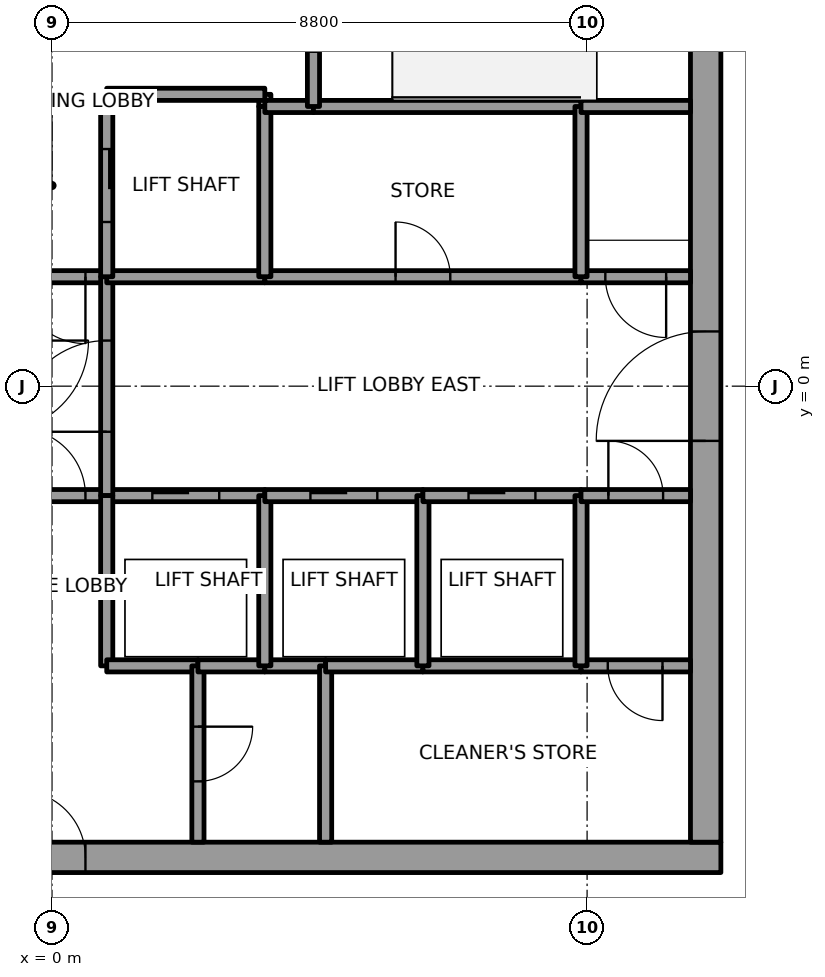
"""IFC4 building model, lengths in metres.
Left out: names, types, materials, properties, quantities, classifications, styles, units other than length and angle.
Written with IfcOpenShell. Run it as: python <this file> out.ifc"""

import sys

from ifc_helpers import new_model, si_unit, direction, frame, frame_2d, origin, place, context, subcontext, project, spatial, rectangle, extrude, element, fill, save


model = new_model("IFC4")
c1 = context("Model", 3, precision=1e-05, world=origin(), true_north=direction((0.0, 1.0)))
c2 = subcontext(c1, "Body", "Model", "MODEL_VIEW")
j1 = project(units=[si_unit("LENGTHUNIT", "METRE"), si_unit("PLANEANGLEUNIT", "RADIAN")], contexts=[c1])
p1 = place(None, origin())
s1 = spatial("IfcSite", under=j1, at=p1, CompositionType="ELEMENT")
p2 = place(p1, origin())
s2 = spatial("IfcBuilding", under=s1, at=p2, CompositionType="ELEMENT")
p3 = place(p2, frame((0.0, 0.0, 251.0)))
s3 = spatial("IfcBuildingStorey", under=s2, at=p3, CompositionType="ELEMENT", Elevation=251.0)
p4 = place(p3, frame((-11.0, -7.75, 0.0), z_axis=(0.0, 0.0, 1.0), x_axis=(1.0, 0.0, 0.0)))
e1 = element("IfcWall", 1, at=p4, inside=s3, PredefinedType="SHEAR", context=c2, shape_type="SweptSolid", body=[
    extrude(rectangle(XDim=22.0, YDim=0.5, at=frame_2d((11.0, 0.0))), origin(), (0.0, 0.0, 1.0), 4.0),
])
p5 = place(p4, frame((10.45, 0.0, 0.0)))
e2 = element("IfcOpeningElement", 2, at=p5, cuts=e1, PredefinedType="OPENING", context=c2, shape_type="SweptSolid", body=[
    extrude(rectangle(XDim=1.1, YDim=2.1, at=frame_2d((0.55, 1.05))), frame((0.0, 0.25, 0.0), z_axis=(0.0, -1.0, 0.0), x_axis=(1.0, 0.0, 0.0)), (0.0, 0.0, 1.0), 0.5),
])
p6 = place(p3, frame((10.75, -7.5, 0.0), z_axis=(0.0, 0.0, 1.0), x_axis=(0.0, 1.0, 0.0)))
e3 = element("IfcWall", 3, at=p6, inside=s3, PredefinedType="SHEAR", context=c2, shape_type="SweptSolid", body=[
    extrude(rectangle(XDim=15.0, YDim=0.5, at=frame_2d((7.5, 0.0))), origin(), (0.0, 0.0, 1.0), 4.0),
])
p7 = place(p6, frame((6.6, 0.0, 0.0)))
e4 = element("IfcOpeningElement", 4, at=p7, cuts=e3, PredefinedType="OPENING", context=c2, shape_type="SweptSolid", body=[
    extrude(rectangle(XDim=1.8, YDim=2.1, at=frame_2d((0.9, 1.05))), frame((0.0, 0.25, 0.0), z_axis=(0.0, -1.0, 0.0), x_axis=(1.0, 0.0, 0.0)), (0.0, 0.0, 1.0), 0.5),
])
p8 = place(p3, frame((-0.9, -1.8, 0.0), z_axis=(0.0, 0.0, 1.0), x_axis=(1.0, 0.0, 0.0)))
e5 = element("IfcWall", 5, at=p8, inside=s3, PredefinedType="SOLIDWALL", context=c2, shape_type="SweptSolid", body=[
    extrude(rectangle(XDim=1.8, YDim=0.2, at=frame_2d((0.9, 0.0))), origin(), (0.0, 0.0, 1.0), 3.85),
])
p9 = place(p8, frame((0.35, 0.0, 0.0)))
e6 = element("IfcOpeningElement", 6, at=p9, cuts=e5, PredefinedType="OPENING", context=c2, shape_type="SweptSolid", body=[
    extrude(rectangle(XDim=1.1, YDim=2.1, at=frame_2d((0.55, 1.05))), frame((0.0, 0.1, 0.0), z_axis=(0.0, -1.0, 0.0), x_axis=(1.0, 0.0, 0.0)), (0.0, 0.0, 1.0), 0.2),
])
p10 = place(p3, frame((0.9, 1.8, 0.0), z_axis=(0.0, 0.0, 1.0), x_axis=(-1.0, 0.0, 0.0)))
e7 = element("IfcWall", 7, at=p10, inside=s3, PredefinedType="SOLIDWALL", context=c2, shape_type="SweptSolid", body=[
    extrude(rectangle(XDim=1.8, YDim=0.2, at=frame_2d((0.9, 0.0))), origin(), (0.0, 0.0, 1.0), 3.85),
])
p11 = place(p10, frame((0.35, 0.0, 0.0)))
e8 = element("IfcOpeningElement", 8, at=p11, cuts=e7, PredefinedType="OPENING", context=c2, shape_type="SweptSolid", body=[
    extrude(rectangle(XDim=1.1, YDim=2.1, at=frame_2d((0.55, 1.05))), frame((0.0, 0.1, 0.0), z_axis=(0.0, -1.0, 0.0), x_axis=(1.0, 0.0, 0.0)), (0.0, 0.0, 1.0), 0.2),
])
p12 = place(p3, frame((0.9, -1.8, 0.0), z_axis=(0.0, 0.0, 1.0), x_axis=(1.0, 0.0, 0.0)))
e9 = element("IfcWall", 9, at=p12, inside=s3, PredefinedType="SOLIDWALL", context=c2, shape_type="SweptSolid", body=[
    extrude(rectangle(XDim=2.6, YDim=0.2, at=frame_2d((1.3, 0.0))), origin(), (0.0, 0.0, 1.0), 3.85),
])
p13 = place(p12, frame((0.75, 0.0, 0.0)))
e10 = element("IfcOpeningElement", 10, at=p13, cuts=e9, PredefinedType="OPENING", context=c2, shape_type="SweptSolid", body=[
    extrude(rectangle(XDim=1.1, YDim=2.1, at=frame_2d((0.55, 1.05))), frame((0.0, 0.1, 0.0), z_axis=(0.0, -1.0, 0.0), x_axis=(1.0, 0.0, 0.0)), (0.0, 0.0, 1.0), 0.2),
])
p14 = place(p3, frame((0.9, -1.8, 0.0), z_axis=(0.0, 0.0, 1.0), x_axis=(0.0, 1.0, 0.0)))
e11 = element("IfcWall", 11, at=p14, inside=s3, PredefinedType="SOLIDWALL", context=c2, shape_type="SweptSolid", body=[
    extrude(rectangle(XDim=3.6, YDim=0.2, at=frame_2d((1.8, 0.0))), origin(), (0.0, 0.0, 1.0), 3.85),
])
p15 = place(p14, frame((1.05, 0.0, 0.0)))
e12 = element("IfcOpeningElement", 12, at=p15, cuts=e11, PredefinedType="OPENING", context=c2, shape_type="SweptSolid", body=[
    extrude(rectangle(XDim=1.5, YDim=2.1, at=frame_2d((0.75, 1.05))), frame((0.0, 0.1, 0.0), z_axis=(0.0, -1.0, 0.0), x_axis=(1.0, 0.0, 0.0)), (0.0, 0.0, 1.0), 0.2),
])
p16 = place(p3, frame((0.9, -1.8, 0.0), z_axis=(0.0, 0.0, 1.0), x_axis=(0.0, -1.0, 0.0)))
e13 = element("IfcWall", 13, at=p16, inside=s3, PredefinedType="SOLIDWALL", context=c2, shape_type="SweptSolid", body=[
    extrude(rectangle(XDim=2.8, YDim=0.2, at=frame_2d((1.4, 0.0))), origin(), (0.0, 0.0, 1.0), 3.85),
])
p17 = place(p3, frame((0.9, -4.6, 0.0), z_axis=(0.0, 0.0, 1.0), x_axis=(1.0, 0.0, 0.0)))
e14 = element("IfcWall", 14, at=p17, inside=s3, PredefinedType="SOLIDWALL", context=c2, shape_type="SweptSolid", body=[
    extrude(rectangle(XDim=1.5, YDim=0.2, at=frame_2d((0.75, 0.0))), origin(), (0.0, 0.0, 1.0), 3.85),
])
p18 = place(p3, frame((3.5, 1.8, 0.0), z_axis=(0.0, 0.0, 1.0), x_axis=(-1.0, 0.0, 0.0)))
e15 = element("IfcWall", 15, at=p18, inside=s3, PredefinedType="SOLIDWALL", context=c2, shape_type="SweptSolid", body=[
    extrude(rectangle(XDim=2.6, YDim=0.2, at=frame_2d((1.3, 0.0))), origin(), (0.0, 0.0, 1.0), 3.85),
])
p19 = place(p3, frame((3.5, 4.6, 0.0), z_axis=(0.0, 0.0, 1.0), x_axis=(0.0, 1.0, 0.0)))
e16 = element("IfcWall", 16, at=p19, inside=s3, PredefinedType="SOLIDWALL", context=c2, shape_type="SweptSolid", body=[
    extrude(rectangle(XDim=0.2, YDim=0.2, at=frame_2d((0.1, 0.0))), origin(), (0.0, 0.0, 1.0), 3.85),
])
p20 = place(p3, frame((3.5, 4.8, 0.0), z_axis=(0.0, 0.0, 1.0), x_axis=(-1.0, 0.0, 0.0)))
e17 = element("IfcWall", 17, at=p20, inside=s3, PredefinedType="SOLIDWALL", context=c2, shape_type="SweptSolid", body=[
    extrude(rectangle(XDim=2.6, YDim=0.2, at=frame_2d((1.3, 0.0))), origin(), (0.0, 0.0, 1.0), 3.85),
])
p21 = place(p3, frame((0.9, 4.8, 0.0), z_axis=(0.0, 0.0, 1.0), x_axis=(0.0, -1.0, 0.0)))
e18 = element("IfcWall", 18, at=p21, inside=s3, PredefinedType="SOLIDWALL", context=c2, shape_type="SweptSolid", body=[
    extrude(rectangle(XDim=3.0, YDim=0.2, at=frame_2d((1.5, 0.0))), origin(), (0.0, 0.0, 1.0), 3.85),
])
p22 = place(p21, frame((0.9, 0.0, 0.0)))
e19 = element("IfcOpeningElement", 19, at=p22, cuts=e18, PredefinedType="OPENING", context=c2, shape_type="SweptSolid", body=[
    extrude(rectangle(XDim=1.2, YDim=2.1, at=frame_2d((0.6, 1.05))), frame((0.0, 0.1, 0.0), z_axis=(0.0, -1.0, 0.0), x_axis=(1.0, 0.0, 0.0)), (0.0, 0.0, 1.0), 0.2),
])
p23 = place(p3, frame((2.4, -4.6, 0.0), z_axis=(0.0, 0.0, 1.0), x_axis=(0.0, -1.0, 0.0)))
e20 = element("IfcWall", 20, at=p23, inside=s3, PredefinedType="SOLIDWALL", context=c2, shape_type="SweptSolid", body=[
    extrude(rectangle(XDim=2.9, YDim=0.2, at=frame_2d((1.45, 0.0))), origin(), (0.0, 0.0, 1.0), 3.85),
])
p24 = place(p23, frame((1.0, 0.0, 0.0)))
e21 = element("IfcOpeningElement", 21, at=p24, cuts=e20, PredefinedType="OPENING", context=c2, shape_type="SweptSolid", body=[
    extrude(rectangle(XDim=0.9, YDim=2.1, at=frame_2d((0.45, 1.05))), frame((0.0, 0.1, 0.0), z_axis=(0.0, -1.0, 0.0), x_axis=(1.0, 0.0, 0.0)), (0.0, 0.0, 1.0), 0.2),
])
p25 = place(p3, frame((3.5, -4.6, 0.0), z_axis=(0.0, 0.0, 1.0), x_axis=(-1.0, 0.0, 0.0)))
e22 = element("IfcWall", 22, at=p25, inside=s3, PredefinedType="SOLIDWALL", context=c2, shape_type="SweptSolid", body=[
    extrude(rectangle(XDim=1.1, YDim=0.2, at=frame_2d((0.55, 0.0))), origin(), (0.0, 0.0, 1.0), 3.85),
])
p26 = place(p3, frame((4.5, -4.6, 0.0), z_axis=(0.0, 0.0, 1.0), x_axis=(-1.0, 0.0, 0.0)))
e23 = element("IfcWall", 23, at=p26, inside=s3, PredefinedType="SOLIDWALL", context=c2, shape_type="SweptSolid", body=[
    extrude(rectangle(XDim=1.0, YDim=0.2, at=frame_2d((0.5, 0.0))), origin(), (0.0, 0.0, 1.0), 3.85),
])
p27 = place(p3, frame((3.5, -4.6, 0.0), z_axis=(0.0, 0.0, 1.0), x_axis=(0.0, 1.0, 0.0)))
e24 = element("IfcWall", 24, at=p27, inside=s3, PredefinedType="SOLIDWALL", context=c2, shape_type="SweptSolid", body=[
    extrude(rectangle(XDim=2.8, YDim=0.2, at=frame_2d((1.4, 0.0))), origin(), (0.0, 0.0, 1.0), 3.85),
])
p28 = place(p3, frame((3.5, -1.8, 0.0), z_axis=(0.0, 0.0, 1.0), x_axis=(1.0, 0.0, 0.0)))
e25 = element("IfcWall", 25, at=p28, inside=s3, PredefinedType="SOLIDWALL", context=c2, shape_type="SweptSolid", body=[
    extrude(rectangle(XDim=2.6, YDim=0.2, at=frame_2d((1.3, 0.0))), origin(), (0.0, 0.0, 1.0), 3.85),
])
p29 = place(p28, frame((0.75, 0.0, 0.0)))
e26 = element("IfcOpeningElement", 26, at=p29, cuts=e25, PredefinedType="OPENING", context=c2, shape_type="SweptSolid", body=[
    extrude(rectangle(XDim=1.1, YDim=2.1, at=frame_2d((0.55, 1.05))), frame((0.0, 0.1, 0.0), z_axis=(0.0, -1.0, 0.0), x_axis=(1.0, 0.0, 0.0)), (0.0, 0.0, 1.0), 0.2),
])
p30 = place(p3, frame((3.5, 1.8, 0.0), z_axis=(0.0, 0.0, 1.0), x_axis=(1.0, 0.0, 0.0)))
e27 = element("IfcWall", 27, at=p30, inside=s3, PredefinedType="SOLIDWALL", context=c2, shape_type="SweptSolid", body=[
    extrude(rectangle(XDim=5.2, YDim=0.2, at=frame_2d((2.6, 0.0))), origin(), (0.0, 0.0, 1.0), 3.85),
])
p31 = place(p30, frame((2.15, 0.0, 0.0)))
e28 = element("IfcOpeningElement", 28, at=p31, cuts=e27, PredefinedType="OPENING", context=c2, shape_type="SweptSolid", body=[
    extrude(rectangle(XDim=0.9, YDim=2.1, at=frame_2d((0.45, 1.05))), frame((0.0, 0.1, 0.0), z_axis=(0.0, -1.0, 0.0), x_axis=(1.0, 0.0, 0.0)), (0.0, 0.0, 1.0), 0.2),
])
p32 = place(p3, frame((3.5, 4.6, 0.0), z_axis=(0.0, 0.0, 1.0), x_axis=(0.0, -1.0, 0.0)))
e29 = element("IfcWall", 29, at=p32, inside=s3, PredefinedType="SOLIDWALL", context=c2, shape_type="SweptSolid", body=[
    extrude(rectangle(XDim=2.8, YDim=0.2, at=frame_2d((1.4, 0.0))), origin(), (0.0, 0.0, 1.0), 3.85),
])
p33 = place(p3, frame((4.3, 4.6, 0.0), z_axis=(0.0, 0.0, 1.0), x_axis=(-1.0, 0.0, 0.0)))
e30 = element("IfcWall", 30, at=p33, inside=s3, PredefinedType="SOLIDWALL", context=c2, shape_type="SweptSolid", body=[
    extrude(rectangle(XDim=0.8, YDim=0.2, at=frame_2d((0.4, 0.0))), origin(), (0.0, 0.0, 1.0), 3.85),
])
p34 = place(p3, frame((8.7, 4.6, 0.0), z_axis=(0.0, 0.0, 1.0), x_axis=(-1.0, 0.0, 0.0)))
e31 = element("IfcWall", 31, at=p34, inside=s3, PredefinedType="SOLIDWALL", context=c2, shape_type="SweptSolid", body=[
    extrude(rectangle(XDim=4.4, YDim=0.2, at=frame_2d((2.2, 0.0))), origin(), (0.0, 0.0, 1.0), 3.85),
])
p35 = place(p3, frame((4.3, 7.5, 0.0), z_axis=(0.0, 0.0, 1.0), x_axis=(0.0, -1.0, 0.0)))
e32 = element("IfcWall", 32, at=p35, inside=s3, PredefinedType="SOLIDWALL", context=c2, shape_type="SweptSolid", body=[
    extrude(rectangle(XDim=2.9, YDim=0.2, at=frame_2d((1.45, 0.0))), origin(), (0.0, 0.0, 1.0), 3.85),
])
p36 = place(p35, frame((0.9, 0.0, 0.0)))
e33 = element("IfcOpeningElement", 33, at=p36, cuts=e32, PredefinedType="OPENING", context=c2, shape_type="SweptSolid", body=[
    extrude(rectangle(XDim=1.1, YDim=2.1, at=frame_2d((0.55, 1.05))), frame((0.0, 0.1, 0.0), z_axis=(0.0, -1.0, 0.0), x_axis=(1.0, 0.0, 0.0)), (0.0, 0.0, 1.0), 0.2),
])
p37 = place(p3, frame((4.5, -4.6, 0.0), z_axis=(0.0, 0.0, 1.0), x_axis=(0.0, -1.0, 0.0)))
e34 = element("IfcWall", 34, at=p37, inside=s3, PredefinedType="SOLIDWALL", context=c2, shape_type="SweptSolid", body=[
    extrude(rectangle(XDim=2.9, YDim=0.2, at=frame_2d((1.45, 0.0))), origin(), (0.0, 0.0, 1.0), 3.85),
])
p38 = place(p3, frame((6.1, -4.6, 0.0), z_axis=(0.0, 0.0, 1.0), x_axis=(-1.0, 0.0, 0.0)))
e35 = element("IfcWall", 35, at=p38, inside=s3, PredefinedType="SOLIDWALL", context=c2, shape_type="SweptSolid", body=[
    extrude(rectangle(XDim=1.6, YDim=0.2, at=frame_2d((0.8, 0.0))), origin(), (0.0, 0.0, 1.0), 3.85),
])
p39 = place(p3, frame((8.7, -4.6, 0.0), z_axis=(0.0, 0.0, 1.0), x_axis=(-1.0, 0.0, 0.0)))
e36 = element("IfcWall", 36, at=p39, inside=s3, PredefinedType="SOLIDWALL", context=c2, shape_type="SweptSolid", body=[
    extrude(rectangle(XDim=2.6, YDim=0.2, at=frame_2d((1.3, 0.0))), origin(), (0.0, 0.0, 1.0), 3.85),
])
p40 = place(p3, frame((6.1, -4.6, 0.0), z_axis=(0.0, 0.0, 1.0), x_axis=(0.0, 1.0, 0.0)))
e37 = element("IfcWall", 37, at=p40, inside=s3, PredefinedType="SOLIDWALL", context=c2, shape_type="SweptSolid", body=[
    extrude(rectangle(XDim=2.8, YDim=0.2, at=frame_2d((1.4, 0.0))), origin(), (0.0, 0.0, 1.0), 3.85),
])
p41 = place(p3, frame((6.1, -1.8, 0.0), z_axis=(0.0, 0.0, 1.0), x_axis=(1.0, 0.0, 0.0)))
e38 = element("IfcWall", 38, at=p41, inside=s3, PredefinedType="SOLIDWALL", context=c2, shape_type="SweptSolid", body=[
    extrude(rectangle(XDim=2.6, YDim=0.2, at=frame_2d((1.3, 0.0))), origin(), (0.0, 0.0, 1.0), 3.85),
])
p42 = place(p41, frame((0.75, 0.0, 0.0)))
e39 = element("IfcOpeningElement", 39, at=p42, cuts=e38, PredefinedType="OPENING", context=c2, shape_type="SweptSolid", body=[
    extrude(rectangle(XDim=1.1, YDim=2.1, at=frame_2d((0.55, 1.05))), frame((0.0, 0.1, 0.0), z_axis=(0.0, -1.0, 0.0), x_axis=(1.0, 0.0, 0.0)), (0.0, 0.0, 1.0), 0.2),
])
p43 = place(p3, frame((10.5, -4.6, 0.0), z_axis=(0.0, 0.0, 1.0), x_axis=(-1.0, 0.0, 0.0)))
e40 = element("IfcWall", 40, at=p43, inside=s3, PredefinedType="SOLIDWALL", context=c2, shape_type="SweptSolid", body=[
    extrude(rectangle(XDim=1.8, YDim=0.2, at=frame_2d((0.9, 0.0))), origin(), (0.0, 0.0, 1.0), 3.85),
])
p44 = place(p43, frame((0.46, 0.0, 0.0)))
e41 = element("IfcOpeningElement", 41, at=p44, cuts=e40, PredefinedType="OPENING", context=c2, shape_type="SweptSolid", body=[
    extrude(rectangle(XDim=0.9, YDim=2.1, at=frame_2d((0.45, 1.05))), frame((0.0, 0.1, 0.0), z_axis=(0.0, -1.0, 0.0), x_axis=(1.0, 0.0, 0.0)), (0.0, 0.0, 1.0), 0.2),
])
p45 = place(p3, frame((8.7, -1.8, 0.0), z_axis=(0.0, 0.0, 1.0), x_axis=(0.0, -1.0, 0.0)))
e42 = element("IfcWall", 42, at=p45, inside=s3, PredefinedType="SOLIDWALL", context=c2, shape_type="SweptSolid", body=[
    extrude(rectangle(XDim=2.8, YDim=0.2, at=frame_2d((1.4, 0.0))), origin(), (0.0, 0.0, 1.0), 3.85),
])
p46 = place(p3, frame((8.7, -1.8, 0.0), z_axis=(0.0, 0.0, 1.0), x_axis=(1.0, 0.0, 0.0)))
e43 = element("IfcWall", 43, at=p46, inside=s3, PredefinedType="SOLIDWALL", context=c2, shape_type="SweptSolid", body=[
    extrude(rectangle(XDim=1.8, YDim=0.2, at=frame_2d((0.9, 0.0))), origin(), (0.0, 0.0, 1.0), 3.85),
])
p47 = place(p46, frame((0.45, 0.0, 0.0)))
e44 = element("IfcOpeningElement", 44, at=p47, cuts=e43, PredefinedType="OPENING", context=c2, shape_type="SweptSolid", body=[
    extrude(rectangle(XDim=0.9, YDim=2.1, at=frame_2d((0.45, 1.05))), frame((0.0, 0.1, 0.0), z_axis=(0.0, -1.0, 0.0), x_axis=(1.0, 0.0, 0.0)), (0.0, 0.0, 1.0), 0.2),
])
p48 = place(p3, frame((10.5, 1.8, 0.0), z_axis=(0.0, 0.0, 1.0), x_axis=(-1.0, 0.0, 0.0)))
e45 = element("IfcWall", 45, at=p48, inside=s3, PredefinedType="SOLIDWALL", context=c2, shape_type="SweptSolid", body=[
    extrude(rectangle(XDim=1.8, YDim=0.2, at=frame_2d((0.9, 0.0))), origin(), (0.0, 0.0, 1.0), 3.85),
])
p49 = place(p48, frame((0.4, 0.0, 0.0)))
e46 = element("IfcOpeningElement", 46, at=p49, cuts=e45, PredefinedType="OPENING", context=c2, shape_type="SweptSolid", body=[
    extrude(rectangle(XDim=1.0, YDim=2.1, at=frame_2d((0.5, 1.05))), frame((0.0, 0.1, 0.0), z_axis=(0.0, -1.0, 0.0), x_axis=(1.0, 0.0, 0.0)), (0.0, 0.0, 1.0), 0.2),
])
p50 = place(p3, frame((8.7, 1.8, 0.0), z_axis=(0.0, 0.0, 1.0), x_axis=(0.0, 1.0, 0.0)))
e47 = element("IfcWall", 47, at=p50, inside=s3, PredefinedType="SOLIDWALL", context=c2, shape_type="SweptSolid", body=[
    extrude(rectangle(XDim=2.8, YDim=0.2, at=frame_2d((1.4, 0.0))), origin(), (0.0, 0.0, 1.0), 3.85),
])
p51 = place(p3, frame((10.5, 4.6, 0.0), z_axis=(0.0, 0.0, 1.0), x_axis=(-1.0, 0.0, 0.0)))
e48 = element("IfcWall", 48, at=p51, inside=s3, PredefinedType="SOLIDWALL", context=c2, shape_type="SweptSolid", body=[
    extrude(rectangle(XDim=1.8, YDim=0.2, at=frame_2d((0.9, 0.0))), origin(), (0.0, 0.0, 1.0), 3.85),
])
p52 = place(p13, origin())
e49 = element("IfcDoor", 49, at=p52, inside=s3, OperationType="SLIDING_TO_RIGHT", PredefinedType="DOOR", context=c2, shape_type="SweptSolid", body=[
    extrude(rectangle(XDim=1.1, YDim=2.1, at=frame_2d((0.55, 1.05))), frame((0.0, 0.025, 0.0), z_axis=(0.0, -1.0, 0.0), x_axis=(1.0, 0.0, 0.0)), (0.0, 0.0, 1.0), 0.05),
])
fill(e10, e49)
p53 = place(p29, origin())
e50 = element("IfcDoor", 50, at=p53, inside=s3, OperationType="SLIDING_TO_LEFT", PredefinedType="DOOR", context=c2, shape_type="SweptSolid", body=[
    extrude(rectangle(XDim=1.1, YDim=2.1, at=frame_2d((0.55, 1.05))), frame((0.0, 0.025, 0.0), z_axis=(0.0, -1.0, 0.0), x_axis=(1.0, 0.0, 0.0)), (0.0, 0.0, 1.0), 0.05),
])
fill(e26, e50)
p54 = place(p42, origin())
e51 = element("IfcDoor", 51, at=p54, inside=s3, OperationType="SLIDING_TO_RIGHT", PredefinedType="DOOR", context=c2, shape_type="SweptSolid", body=[
    extrude(rectangle(XDim=1.1, YDim=2.1, at=frame_2d((0.55, 1.05))), frame((0.0, 0.025, 0.0), z_axis=(0.0, -1.0, 0.0), x_axis=(1.0, 0.0, 0.0)), (0.0, 0.0, 1.0), 0.05),
])
fill(e39, e51)
p55 = place(p22, origin())
e52 = element("IfcDoor", 52, at=p55, inside=s3, OperationType="SLIDING_TO_RIGHT", PredefinedType="DOOR", context=c2, shape_type="SweptSolid", body=[
    extrude(rectangle(XDim=1.2, YDim=2.1, at=frame_2d((0.6, 1.05))), frame((0.0, 0.025, 0.0), z_axis=(0.0, -1.0, 0.0), x_axis=(1.0, 0.0, 0.0)), (0.0, 0.0, 1.0), 0.05),
])
fill(e19, e52)
p56 = place(p15, origin())
e53 = element("IfcDoor", 53, at=p56, inside=s3, OperationType="DOUBLE_DOOR_SINGLE_SWING", PredefinedType="DOOR", context=c2, shape_type="SweptSolid", body=[
    extrude(rectangle(XDim=1.5, YDim=2.1, at=frame_2d((0.75, 1.05))), frame((0.0, 0.025, 0.0), z_axis=(0.0, -1.0, 0.0), x_axis=(1.0, 0.0, 0.0)), (0.0, 0.0, 1.0), 0.05),
])
fill(e12, e53)
p57 = place(p11, origin())
e54 = element("IfcDoor", 54, at=p57, inside=s3, OperationType="SINGLE_SWING_LEFT", PredefinedType="DOOR", context=c2, shape_type="SweptSolid", body=[
    extrude(rectangle(XDim=1.1, YDim=2.1, at=frame_2d((0.55, 1.05))), frame((0.0, 0.025, 0.0), z_axis=(0.0, -1.0, 0.0), x_axis=(1.0, 0.0, 0.0)), (0.0, 0.0, 1.0), 0.05),
])
fill(e8, e54)
p58 = place(p9, origin())
e55 = element("IfcDoor", 55, at=p58, inside=s3, OperationType="SINGLE_SWING_LEFT", PredefinedType="DOOR", context=c2, shape_type="SweptSolid", body=[
    extrude(rectangle(XDim=1.1, YDim=2.1, at=frame_2d((0.55, 1.05))), frame((0.0, 0.025, 0.0), z_axis=(0.0, -1.0, 0.0), x_axis=(1.0, 0.0, 0.0)), (0.0, 0.0, 1.0), 0.05),
])
fill(e6, e55)
p59 = place(p49, origin())
e56 = element("IfcDoor", 56, at=p59, inside=s3, OperationType="SINGLE_SWING_LEFT", PredefinedType="DOOR", context=c2, shape_type="SweptSolid", body=[
    extrude(rectangle(XDim=1.0, YDim=2.1, at=frame_2d((0.5, 1.05))), frame((0.0, 0.025, 0.0), z_axis=(0.0, -1.0, 0.0), x_axis=(1.0, 0.0, 0.0)), (0.0, 0.0, 1.0), 0.05),
])
fill(e46, e56)
p60 = place(p31, origin())
e57 = element("IfcDoor", 57, at=p60, inside=s3, OperationType="SINGLE_SWING_LEFT", PredefinedType="DOOR", context=c2, shape_type="SweptSolid", body=[
    extrude(rectangle(XDim=0.9, YDim=2.1, at=frame_2d((0.45, 1.05))), frame((0.0, 0.025, 0.0), z_axis=(0.0, -1.0, 0.0), x_axis=(1.0, 0.0, 0.0)), (0.0, 0.0, 1.0), 0.05),
])
fill(e28, e57)
p61 = place(p44, origin())
e58 = element("IfcDoor", 58, at=p61, inside=s3, OperationType="SINGLE_SWING_RIGHT", PredefinedType="DOOR", context=c2, shape_type="SweptSolid", body=[
    extrude(rectangle(XDim=0.9, YDim=2.1, at=frame_2d((0.45, 1.05))), frame((0.0, 0.025, 0.0), z_axis=(0.0, -1.0, 0.0), x_axis=(1.0, 0.0, 0.0)), (0.0, 0.0, 1.0), 0.05),
])
fill(e41, e58)
p62 = place(p47, origin())
e59 = element("IfcDoor", 59, at=p62, inside=s3, OperationType="SINGLE_SWING_LEFT", PredefinedType="DOOR", context=c2, shape_type="SweptSolid", body=[
    extrude(rectangle(XDim=0.9, YDim=2.1, at=frame_2d((0.45, 1.05))), frame((0.0, 0.025, 0.0), z_axis=(0.0, -1.0, 0.0), x_axis=(1.0, 0.0, 0.0)), (0.0, 0.0, 1.0), 0.05),
])
fill(e44, e59)
p63 = place(p24, origin())
e60 = element("IfcDoor", 60, at=p63, inside=s3, OperationType="SINGLE_SWING_RIGHT", PredefinedType="DOOR", context=c2, shape_type="SweptSolid", body=[
    extrude(rectangle(XDim=0.9, YDim=2.1, at=frame_2d((0.45, 1.05))), frame((0.0, 0.025, 0.0), z_axis=(0.0, -1.0, 0.0), x_axis=(1.0, 0.0, 0.0)), (0.0, 0.0, 1.0), 0.05),
])
fill(e21, e60)
p64 = place(p7, origin())
e61 = element("IfcDoor", 61, at=p64, inside=s3, OperationType="DOUBLE_DOOR_SINGLE_SWING", PredefinedType="DOOR", context=c2, shape_type="SweptSolid", body=[
    extrude(rectangle(XDim=1.8, YDim=2.1, at=frame_2d((0.9, 1.05))), frame((0.0, 0.025, 0.0), z_axis=(0.0, -1.0, 0.0), x_axis=(1.0, 0.0, 0.0)), (0.0, 0.0, 1.0), 0.05),
])
fill(e4, e61)
p65 = place(p5, origin())
e62 = element("IfcDoor", 62, at=p65, inside=s3, OperationType="SINGLE_SWING_LEFT", PredefinedType="DOOR", context=c2, shape_type="SweptSolid", body=[
    extrude(rectangle(XDim=1.1, YDim=2.1, at=frame_2d((0.55, 1.05))), frame((0.0, 0.025, 0.0), z_axis=(0.0, -1.0, 0.0), x_axis=(1.0, 0.0, 0.0)), (0.0, 0.0, 1.0), 0.05),
])
fill(e2, e62)
save(model, sys.argv[1])
